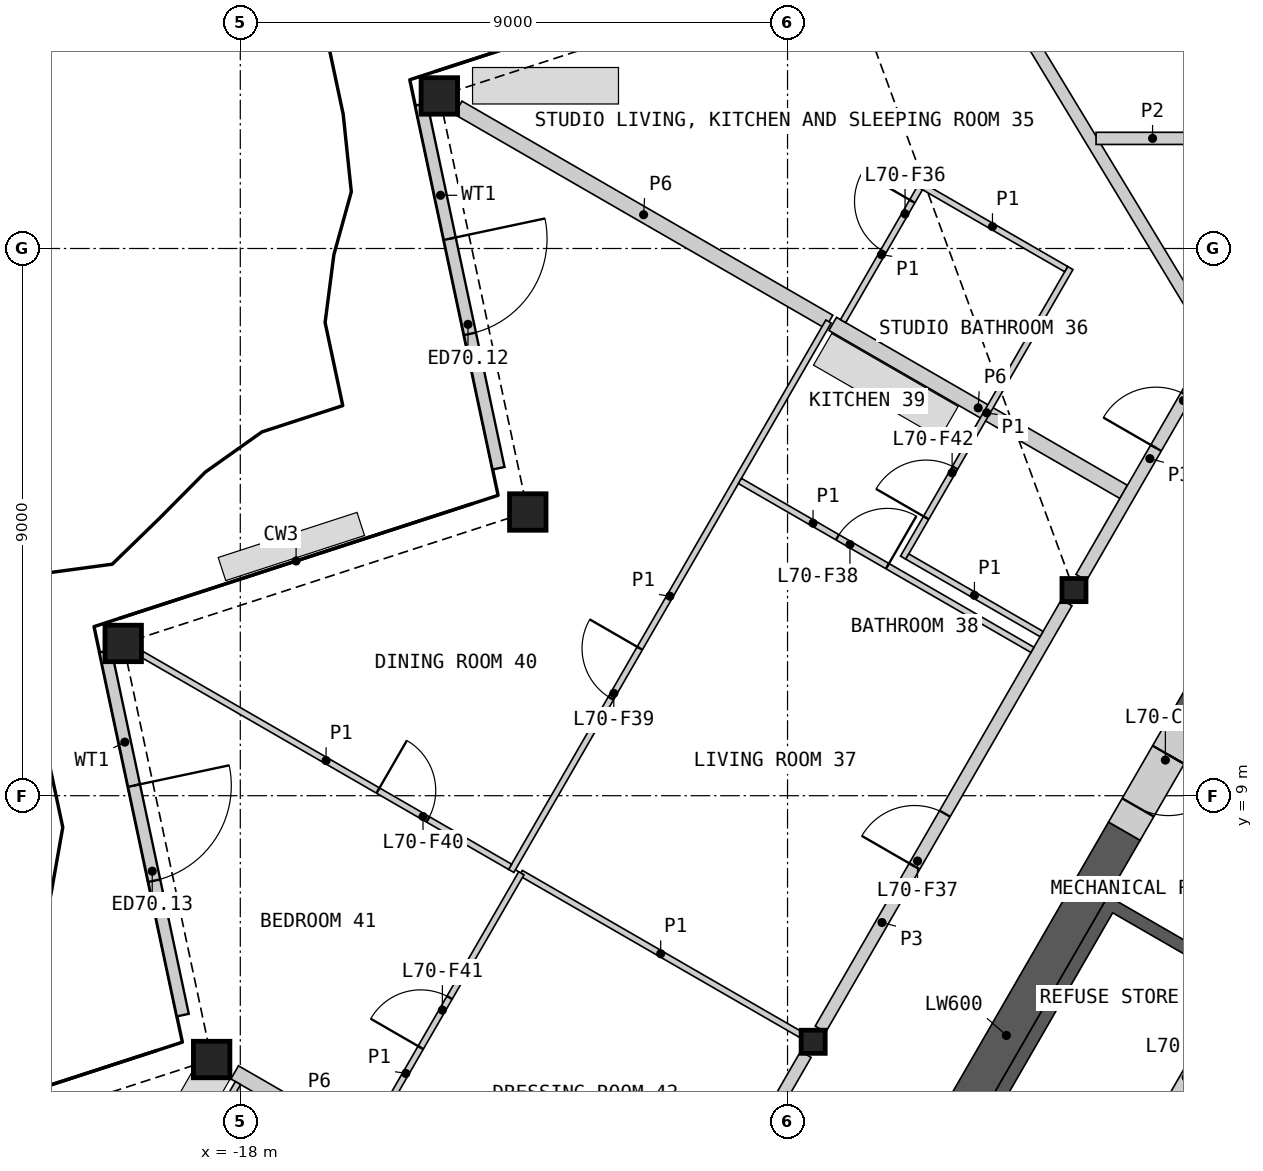
"""IFC4 building model, lengths in metres.
Left out: names, types, materials, properties, quantities, classifications, styles, units other than length and angle.
Written with IfcOpenShell. Run it as: python <this file> out.ifc"""

import sys

from ifc_helpers import new_model, si_unit, direction, frame, frame_2d, origin, origin_2d, place, context, subcontext, project, spatial, polyline, rectangle, hollow_rectangle, i_section, outline, extrude, element, fill, save


model = new_model("IFC4")
c1 = context("Model", 3, precision=1e-05, world=origin(), true_north=direction((0.0, 1.0)))
c2 = subcontext(c1, "Body", "Model", "MODEL_VIEW")
j1 = project(units=[si_unit("LENGTHUNIT", "METRE"), si_unit("PLANEANGLEUNIT", "RADIAN")], contexts=[c1])
p1 = place(None, origin())
s1 = spatial("IfcSite", under=j1, at=p1, CompositionType="ELEMENT")
p2 = place(p1, origin())
s2 = spatial("IfcBuilding", under=s1, at=p2, CompositionType="ELEMENT")
p3 = place(p2, frame((0.0, 0.0, 318.8)))
s3 = spatial("IfcBuildingStorey", under=s2, at=p3, CompositionType="ELEMENT", Elevation=318.8)
for number, where, z_axis, x_axis in (
    (1, (-14.727, 20.509, 0.0), (0.0, 0.0, 1.0), (1.0, 0.0, 0.0)),
    (2, (-13.272, 13.666, 0.0), (0.0, 0.0, 1.0), (1.0, 0.0, 0.0)),
    (3, (-19.926, 11.504, 0.0), (0.0, 0.0, 1.0), (1.0, 0.0, 0.0)),
    (4, (-18.471, 4.661, 0.0), (0.0, 0.0, 1.0), (1.0, 0.0, 0.0)),
):
    element("IfcColumn", number, at=place(p3, frame(where, z_axis=z_axis, x_axis=x_axis)), inside=s3, PredefinedType="COLUMN", context=c2, shape_type="SweptSolid", body=[
        extrude(hollow_rectangle(XDim=0.6, YDim=0.6, WallThickness=0.04, at=origin_2d()), origin(), (0.0, 0.0, 1.0), 3.4),
    ])
for number, where, z_axis, x_axis in (
    (5, (-4.289, 12.382, 0.0), (0.0, 0.0, 1.0), (1.0, 0.0, 0.0)),
    (6, (-8.578, 4.953, 0.0), (0.0, 0.0, 1.0), (1.0, 0.0, 0.0)),
):
    element("IfcColumn", number, at=place(p3, frame(where, z_axis=z_axis, x_axis=x_axis)), inside=s3, PredefinedType="COLUMN", context=c2, shape_type="SweptSolid", body=[
        extrude(i_section(OverallWidth=0.396, OverallDepth=0.381, WebThickness=0.019, FlangeThickness=0.03, at=origin_2d()), origin(), (0.0, 0.0, 1.0), 3.4),
    ])
p4 = place(p3, frame((-15.025, 20.372, 0.0), z_axis=(0.0, 0.0, 1.0), x_axis=(0.207932234858, -0.978143233738, 0.0)))
e7 = element("IfcWall", 7, at=p4, inside=s3, PredefinedType="SOLIDWALL", context=c2, shape_type="SweptSolid", body=[
    extrude(rectangle(XDim=6.12, YDim=0.2, at=frame_2d((3.06, 0.0))), origin(), (0.0, 0.0, 1.0), 2.488),
])
p5 = place(p4, frame((2.26, 0.0, 0.0)))
e8 = element("IfcOpeningElement", 8, at=p5, cuts=e7, PredefinedType="OPENING", context=c2, shape_type="SweptSolid", body=[
    extrude(rectangle(XDim=1.6, YDim=2.25, at=frame_2d((0.8, 1.125))), frame((0.0, 0.11, 0.0), z_axis=(0.0, -1.0, 0.0), x_axis=(1.0, 0.0, 0.0)), (0.0, 0.0, 1.0), 0.22),
])
p6 = place(p3, frame((-20.217, 11.377, 0.0), z_axis=(0.0, 0.0, 1.0), x_axis=(0.207885951908, -0.978153071354, 0.0)))
e9 = element("IfcWall", 9, at=p6, inside=s3, PredefinedType="SOLIDWALL", context=c2, shape_type="SweptSolid", body=[
    extrude(rectangle(XDim=6.12, YDim=0.2, at=frame_2d((3.06, 0.0))), origin(), (0.0, 0.0, 1.0), 2.488),
])
p7 = place(p6, frame((2.26, 0.0, 0.0)))
e10 = element("IfcOpeningElement", 10, at=p7, cuts=e9, PredefinedType="OPENING", context=c2, shape_type="SweptSolid", body=[
    extrude(rectangle(XDim=1.6, YDim=2.25, at=frame_2d((0.8, 1.125))), frame((0.0, 0.11, 0.0), z_axis=(0.0, -1.0, 0.0), x_axis=(1.0, 0.0, 0.0)), (0.0, 0.0, 1.0), 0.22),
])
p8 = place(p3, origin())
e11 = element("IfcWall", 11, at=p8, inside=s3, PredefinedType="SHEAR", context=c2, shape_type="SweptSolid", body=[
    extrude(outline(polyline([(-4.96, 0.208), (-7.131, 1.461), (-3.731, 7.35), (-1.561, 6.097), (-1.66, 5.924), (-3.652, 7.074), (-5.752, 3.437), (-3.76, 2.287), (-3.861, 2.113), (-5.852, 3.263), (-6.852, 1.531), (-4.861, 0.381), (-4.96, 0.208)])), origin(), (0.0, 0.0, 1.0), 3.1),
])
p9 = place(p3, frame((-1.631, 5.776, 0.0), z_axis=(0.0, 0.0, 1.0), x_axis=(-0.499992876559, -0.866029516466, 0.0)))
e12 = element("IfcWall", 12, at=p9, inside=s3, PredefinedType="SOLIDWALL", context=c2, shape_type="SweptSolid", body=[
    extrude(rectangle(XDim=6.486, YDim=0.2, at=frame_2d((3.243, 0.0))), origin(), (0.0, 0.0, 1.0), 3.1),
])
p10 = place(p9, frame((1.537, 0.0, 0.0)))
e13 = element("IfcOpeningElement", 13, at=p10, cuts=e12, PredefinedType="OPENING", context=c2, shape_type="SweptSolid", body=[
    extrude(rectangle(XDim=0.9, YDim=2.1, at=frame_2d((0.45, 1.05))), frame((0.0, 0.11, 0.0), z_axis=(0.0, -1.0, 0.0), x_axis=(1.0, 0.0, 0.0)), (0.0, 0.0, 1.0), 0.22),
])
p11 = place(p9, frame((4.837, 0.0, 0.0)))
e14 = element("IfcOpeningElement", 14, at=p11, cuts=e12, PredefinedType="OPENING", context=c2, shape_type="SweptSolid", body=[
    extrude(rectangle(XDim=0.9, YDim=2.1, at=frame_2d((0.45, 1.05))), frame((0.0, 0.11, 0.0), z_axis=(0.0, -1.0, 0.0), x_axis=(1.0, 0.0, 0.0)), (0.0, 0.0, 1.0), 0.22),
])
p12 = place(p3, frame((-3.461, 8.417, 0.0), z_axis=(0.0, 0.0, 1.0), x_axis=(-0.50000391502, -0.866023143435, 0.0)))
e15 = element("IfcWall", 15, at=p12, inside=s3, PredefinedType="SHEAR", context=c2, shape_type="SweptSolid", body=[
    extrude(rectangle(XDim=7.759, YDim=0.6, at=frame_2d((3.879, 0.0))), origin(), (0.0, 0.0, 1.0), 3.1),
])
p13 = place(p3, frame((-1.59, 11.658, 0.0), z_axis=(0.0, 0.0, 1.0), x_axis=(-0.500037594623, -0.866003697431, 0.0)))
e16 = element("IfcWall", 16, at=p13, inside=s3, PredefinedType="SHEAR", context=c2, shape_type="SweptSolid", body=[
    extrude(rectangle(XDim=1.542, YDim=0.6, at=frame_2d((0.771, 0.0))), origin(), (0.0, 0.0, 1.0), 3.1),
])
p14 = place(p3, frame((-2.361, 10.322, 0.0), z_axis=(0.0, 0.0, 1.0), x_axis=(-0.499946605688, -0.86605622881, 0.0)))
e17 = element("IfcWall", 17, at=p14, inside=s3, PredefinedType="SHEAR", context=c2, shape_type="SweptSolid", body=[
    extrude(rectangle(XDim=2.2, YDim=0.6, at=frame_2d((1.1, 0.0))), origin(), (0.0, 0.0, 1.0), 3.1),
])
p15 = place(p14, frame((0.75, 0.0, 0.0)))
e18 = element("IfcOpeningElement", 18, at=p15, cuts=e17, PredefinedType="OPENING", context=c2, shape_type="SweptSolid", body=[
    extrude(rectangle(XDim=1.0, YDim=2.1, at=frame_2d((0.5, 1.05))), frame((0.0, 0.31, 0.0), z_axis=(0.0, -1.0, 0.0), x_axis=(1.0, 0.0, 0.0)), (0.0, 0.0, 1.0), 0.62),
])
p16 = place(p3, frame((-8.458, 5.16, 0.0), z_axis=(0.0, 0.0, 1.0), x_axis=(0.499984266882, 0.866034487114, 0.0)))
e19 = element("IfcWall", 19, at=p16, inside=s3, PredefinedType="PARTITIONING", context=c2, shape_type="SweptSolid", body=[
    extrude(rectangle(XDim=8.099, YDim=0.2, at=frame_2d((4.049, 0.0))), origin(), (0.0, 0.0, 1.0), 3.1),
])
p17 = place(p16, frame((3.093, 0.0, 0.0)))
e20 = element("IfcOpeningElement", 20, at=p17, cuts=e19, PredefinedType="OPENING", context=c2, shape_type="SweptSolid", body=[
    extrude(rectangle(XDim=1.0, YDim=2.1, at=frame_2d((0.5, 1.05))), frame((0.0, 0.11, 0.0), z_axis=(0.0, -1.0, 0.0), x_axis=(1.0, 0.0, 0.0)), (0.0, 0.0, 1.0), 0.22),
])
p18 = place(p3, frame((-12.748, -2.269, 0.0), z_axis=(0.0, 0.0, 1.0), x_axis=(0.499984266882, 0.866034487114, 0.0)))
e21 = element("IfcWall", 21, at=p18, inside=s3, PredefinedType="PARTITIONING", context=c2, shape_type="SweptSolid", body=[
    extrude(rectangle(XDim=8.099, YDim=0.2, at=frame_2d((4.049, 0.0))), origin(), (0.0, 0.0, 1.0), 3.1),
])
p19 = place(p18, frame((1.164, 0.0, 0.0)))
e22 = element("IfcOpeningElement", 22, at=p19, cuts=e21, PredefinedType="OPENING", context=c2, shape_type="SweptSolid", body=[
    extrude(rectangle(XDim=1.0, YDim=2.1, at=frame_2d((0.5, 1.05))), frame((0.0, 0.11, 0.0), z_axis=(0.0, -1.0, 0.0), x_axis=(1.0, 0.0, 0.0)), (0.0, 0.0, 1.0), 0.22),
])
p20 = place(p3, frame((-14.417, 20.316, 0.0), z_axis=(0.0, 0.0, 1.0), x_axis=(0.866022207469, -0.50000553614, 0.0)))
e23 = element("IfcWall", 23, at=p20, inside=s3, PredefinedType="PARTITIONING", context=c2, shape_type="SweptSolid", body=[
    extrude(rectangle(XDim=7.042, YDim=0.25, at=frame_2d((3.521, 0.0))), origin(), (0.0, 0.0, 1.0), 2.33),
])
p21 = place(p3, frame((-8.257, 16.76, 0.0), z_axis=(0.0, 0.0, 1.0), x_axis=(0.866034739526, -0.499983829672, 0.0)))
e24 = element("IfcWall", 24, at=p21, inside=s3, PredefinedType="PARTITIONING", context=c2, shape_type="SweptSolid", body=[
    extrude(rectangle(XDim=5.525, YDim=0.25, at=frame_2d((2.763, 0.0))), origin(), (0.0, 0.0, 1.0), 2.33),
])
p22 = place(p3, frame((-4.169, 12.59, 0.0), z_axis=(0.0, 0.0, 1.0), x_axis=(0.499950370306, 0.866054055606, 0.0)))
e25 = element("IfcWall", 25, at=p22, inside=s3, PredefinedType="PARTITIONING", context=c2, shape_type="SweptSolid", body=[
    extrude(rectangle(XDim=4.513, YDim=0.2, at=frame_2d((2.256, 0.0))), origin(), (0.0, 0.0, 1.0), 3.1),
])
p23 = place(p22, frame((2.459, 0.0, 0.0)))
e26 = element("IfcOpeningElement", 26, at=p23, cuts=e25, PredefinedType="OPENING", context=c2, shape_type="SweptSolid", body=[
    extrude(rectangle(XDim=1.0, YDim=2.1, at=frame_2d((0.5, 1.05))), frame((0.0, 0.11, 0.0), z_axis=(0.0, -1.0, 0.0), x_axis=(1.0, 0.0, 0.0)), (0.0, 0.0, 1.0), 0.22),
])
p24 = place(p3, frame((-18.092, 4.449, 0.0), z_axis=(0.0, 0.0, 1.0), x_axis=(0.866043267704, -0.499969057507, 0.0)))
e27 = element("IfcWall", 27, at=p24, inside=s3, PredefinedType="PARTITIONING", context=c2, shape_type="SweptSolid", body=[
    extrude(rectangle(XDim=2.571, YDim=0.25, at=frame_2d((1.286, 0.0))), origin(), (0.0, 0.0, 1.0), 2.33),
])
p25 = place(p3, frame((-9.669, 29.144, 0.0), z_axis=(0.0, 0.0, 1.0), x_axis=(0.517770554559, -0.85551952218, 0.0)))
e28 = element("IfcWall", 28, at=p25, inside=s3, PredefinedType="PARTITIONING", context=c2, shape_type="SweptSolid", body=[
    extrude(rectangle(XDim=14.784, YDim=0.2, at=frame_2d((7.392, 0.0))), origin(), (0.0, 0.0, 1.0), 2.33),
])
p26 = place(p3, frame((-3.926, 19.811, 0.0), z_axis=(0.0, 0.0, 1.0), x_axis=(1.0, 0.0, 0.0)))
e29 = element("IfcWall", 29, at=p26, inside=s3, PredefinedType="PARTITIONING", context=c2, shape_type="SweptSolid", body=[
    extrude(rectangle(XDim=3.718, YDim=0.2, at=frame_2d((1.859, 0.0))), origin(), (0.0, 0.0, 1.0), 2.33),
])
p27 = place(p26, frame((1.59, 0.0, 0.0)))
e30 = element("IfcOpeningElement", 30, at=p27, cuts=e29, PredefinedType="OPENING", context=c2, shape_type="SweptSolid", body=[
    extrude(rectangle(XDim=0.95, YDim=2.1, at=frame_2d((0.475, 1.05))), frame((0.0, 0.11, 0.0), z_axis=(0.0, -1.0, 0.0), x_axis=(1.0, 0.0, 0.0)), (0.0, 0.0, 1.0), 0.22),
])
p28 = place(p3, frame((-13.544, 7.762, 0.0), z_axis=(0.0, 0.0, 1.0), x_axis=(0.499993819111, 0.866028972293, 0.0)))
e31 = element("IfcWall", 31, at=p28, inside=s3, PredefinedType="PARTITIONING", context=c2, shape_type="SweptSolid", body=[
    extrude(rectangle(XDim=10.436, YDim=0.1, at=frame_2d((5.218, 0.0))), origin(), (0.0, 0.0, 1.0), 2.33),
])
p29 = place(p28, frame((3.279, 0.0, 0.0)))
e32 = element("IfcOpeningElement", 32, at=p29, cuts=e31, PredefinedType="OPENING", context=c2, shape_type="SweptSolid", body=[
    extrude(rectangle(XDim=0.95, YDim=2.1, at=frame_2d((0.475, 1.05))), frame((0.0, 0.06, 0.0), z_axis=(0.0, -1.0, 0.0), x_axis=(1.0, 0.0, 0.0)), (0.0, 0.0, 1.0), 0.12),
])
p30 = place(p3, frame((-19.615, 11.325, 0.0), z_axis=(0.0, 0.0, 1.0), x_axis=(0.866013987544, -0.500019772988, 0.0)))
e33 = element("IfcWall", 33, at=p30, inside=s3, PredefinedType="PARTITIONING", context=c2, shape_type="SweptSolid", body=[
    extrude(rectangle(XDim=6.99, YDim=0.1, at=frame_2d((3.495, 0.0))), origin(), (0.0, 0.0, 1.0), 2.33),
])
p31 = place(p30, frame((4.48, 0.0, 0.0)))
e34 = element("IfcOpeningElement", 34, at=p31, cuts=e33, PredefinedType="OPENING", context=c2, shape_type="SweptSolid", body=[
    extrude(rectangle(XDim=0.95, YDim=2.1, at=frame_2d((0.475, 1.05))), frame((0.0, 0.06, 0.0), z_axis=(0.0, -1.0, 0.0), x_axis=(1.0, 0.0, 0.0)), (0.0, 0.0, 1.0), 0.12),
])
p32 = place(p3, frame((-9.783, 14.177, 0.0), z_axis=(0.0, 0.0, 1.0), x_axis=(0.866030435321, -0.499991285022, 0.0)))
e35 = element("IfcWall", 35, at=p32, inside=s3, PredefinedType="PARTITIONING", context=c2, shape_type="SweptSolid", body=[
    extrude(rectangle(XDim=5.555, YDim=0.1, at=frame_2d((2.778, 0.0))), origin(), (0.0, 0.0, 1.0), 2.33),
])
p33 = place(p32, frame((1.852, 0.0, 0.0)))
e36 = element("IfcOpeningElement", 36, at=p33, cuts=e35, PredefinedType="OPENING", context=c2, shape_type="SweptSolid", body=[
    extrude(rectangle(XDim=0.95, YDim=2.1, at=frame_2d((0.475, 1.05))), frame((0.0, 0.06, 0.0), z_axis=(0.0, -1.0, 0.0), x_axis=(1.0, 0.0, 0.0)), (0.0, 0.0, 1.0), 0.12),
])
p34 = place(p3, frame((-7.099, 12.915, 0.0), z_axis=(0.0, 0.0, 1.0), x_axis=(0.49997732567, 0.866038494419, 0.0)))
e37 = element("IfcWall", 37, at=p34, inside=s3, PredefinedType="PARTITIONING", context=c2, shape_type="SweptSolid", body=[
    extrude(rectangle(XDim=5.5, YDim=0.1, at=frame_2d((2.75, 0.0))), origin(), (0.0, 0.0, 1.0), 2.33),
])
p35 = place(p34, frame((0.756, 0.0, 0.0)))
e38 = element("IfcOpeningElement", 38, at=p35, cuts=e37, PredefinedType="OPENING", context=c2, shape_type="SweptSolid", body=[
    extrude(rectangle(XDim=0.95, YDim=2.1, at=frame_2d((0.475, 1.05))), frame((0.0, 0.06, 0.0), z_axis=(0.0, -1.0, 0.0), x_axis=(1.0, 0.0, 0.0)), (0.0, 0.0, 1.0), 0.12),
])
p36 = place(p3, frame((-13.386, 7.729, 0.0), z_axis=(0.0, 0.0, 1.0), x_axis=(0.866034036823, -0.49998504684, 0.0)))
e39 = element("IfcWall", 39, at=p36, inside=s3, PredefinedType="PARTITIONING", context=c2, shape_type="SweptSolid", body=[
    extrude(rectangle(XDim=5.312, YDim=0.1, at=frame_2d((2.656, 0.0))), origin(), (0.0, 0.0, 1.0), 2.33),
])
p37 = place(p3, frame((-15.912, 3.335, 0.0), z_axis=(0.0, 0.0, 1.0), x_axis=(0.49999906822, 0.866025941747, 0.0)))
e40 = element("IfcWall", 40, at=p37, inside=s3, PredefinedType="PARTITIONING", context=c2, shape_type="SweptSolid", body=[
    extrude(rectangle(XDim=5.068, YDim=0.1, at=frame_2d((2.534, 0.0))), origin(), (0.0, 0.0, 1.0), 2.33),
])
p38 = place(p37, frame((1.757, 0.0, 0.0)))
e41 = element("IfcOpeningElement", 41, at=p38, cuts=e40, PredefinedType="OPENING", context=c2, shape_type="SweptSolid", body=[
    extrude(rectangle(XDim=0.95, YDim=2.1, at=frame_2d((0.475, 1.05))), frame((0.0, 0.06, 0.0), z_axis=(0.0, -1.0, 0.0), x_axis=(1.0, 0.0, 0.0)), (0.0, 0.0, 1.0), 0.12),
])
p39 = place(p3, frame((-20.547, -0.072, 0.0), z_axis=(0.0, 0.0, 1.0), x_axis=(0.499969537666, 0.866042990507, 0.0)))
e42 = element("IfcWall", 42, at=p39, inside=s3, PredefinedType="PARTITIONING", context=c2, shape_type="SweptSolid", body=[
    extrude(rectangle(XDim=5.018, YDim=0.1, at=frame_2d((2.509, 0.0))), origin(), (0.0, 0.0, 1.0), 2.33),
])
p40 = place(p39, frame((0.862, 0.0, 0.0)))
e43 = element("IfcOpeningElement", 43, at=p40, cuts=e42, PredefinedType="OPENING", context=c2, shape_type="SweptSolid", body=[
    extrude(rectangle(XDim=0.95, YDim=2.1, at=frame_2d((0.475, 1.05))), frame((0.0, 0.06, 0.0), z_axis=(0.0, -1.0, 0.0), x_axis=(1.0, 0.0, 0.0)), (0.0, 0.0, 1.0), 0.12),
])
p41 = place(p3, frame((-6.842, 19.06, 0.0), z_axis=(0.0, 0.0, 1.0), x_axis=(0.866034573852, -0.49998411664, 0.0)))
e44 = element("IfcWall", 44, at=p41, inside=s3, PredefinedType="PARTITIONING", context=c2, shape_type="SweptSolid", body=[
    extrude(rectangle(XDim=2.8, YDim=0.1, at=frame_2d((1.4, 0.0))), origin(), (0.0, 0.0, 1.0), 2.33),
])
p42 = place(p3, frame((-7.031, 12.934, 0.0), z_axis=(0.0, 0.0, 1.0), x_axis=(0.866030925526, -0.499990435942, 0.0)))
e45 = element("IfcWall", 45, at=p42, inside=s3, PredefinedType="PARTITIONING", context=c2, shape_type="SweptSolid", body=[
    extrude(rectangle(XDim=2.55, YDim=0.1, at=frame_2d((1.275, 0.0))), origin(), (0.0, 0.0, 1.0), 2.33),
])
p43 = place(p3, frame((-8.086, 16.805, 0.0), z_axis=(0.0, 0.0, 1.0), x_axis=(0.50001820224, 0.866014894461, 0.0)))
e46 = element("IfcWall", 46, at=p43, inside=s3, PredefinedType="PARTITIONING", context=c2, shape_type="SweptSolid", body=[
    extrude(rectangle(XDim=2.525, YDim=0.1, at=frame_2d((1.262, 0.0))), origin(), (0.0, 0.0, 1.0), 2.33),
])
p44 = place(p43, frame((1.325, 0.0, 0.0)))
e47 = element("IfcOpeningElement", 47, at=p44, cuts=e46, PredefinedType="OPENING", context=c2, shape_type="SweptSolid", body=[
    extrude(rectangle(XDim=0.95, YDim=2.1, at=frame_2d((0.475, 1.05))), frame((0.0, 0.06, 0.0), z_axis=(0.0, -1.0, 0.0), x_axis=(1.0, 0.0, 0.0)), (0.0, 0.0, 1.0), 0.12),
])
p45 = place(p5, origin())
e48 = element("IfcDoor", 48, at=p45, inside=s3, OperationType="DOUBLE_DOOR_SINGLE_SWING", PredefinedType="DOOR", context=c2, shape_type="SweptSolid", body=[
    extrude(rectangle(XDim=1.6, YDim=2.25, at=frame_2d((0.8, 1.125))), frame((0.0, 0.025, 0.0), z_axis=(0.0, -1.0, 0.0), x_axis=(1.0, 0.0, 0.0)), (0.0, 0.0, 1.0), 0.05),
])
fill(e8, e48)
p46 = place(p7, origin())
e49 = element("IfcDoor", 49, at=p46, inside=s3, OperationType="DOUBLE_DOOR_SINGLE_SWING", PredefinedType="DOOR", context=c2, shape_type="SweptSolid", body=[
    extrude(rectangle(XDim=1.6, YDim=2.25, at=frame_2d((0.8, 1.125))), frame((0.0, 0.025, 0.0), z_axis=(0.0, -1.0, 0.0), x_axis=(1.0, 0.0, 0.0)), (0.0, 0.0, 1.0), 0.05),
])
fill(e10, e49)
p47 = place(p10, origin())
e50 = element("IfcDoor", 50, at=p47, inside=s3, OperationType="SINGLE_SWING_LEFT", PredefinedType="DOOR", context=c2, shape_type="SweptSolid", body=[
    extrude(rectangle(XDim=0.9, YDim=2.1, at=frame_2d((0.45, 1.05))), frame((0.0, 0.025, 0.0), z_axis=(0.0, -1.0, 0.0), x_axis=(1.0, 0.0, 0.0)), (0.0, 0.0, 1.0), 0.05),
])
fill(e13, e50)
p48 = place(p15, origin())
e51 = element("IfcDoor", 51, at=p48, inside=s3, OperationType="SINGLE_SWING_LEFT", PredefinedType="DOOR", context=c2, shape_type="SweptSolid", body=[
    extrude(rectangle(XDim=1.0, YDim=2.1, at=frame_2d((0.5, 1.05))), frame((0.0, 0.055, 0.0), z_axis=(0.0, -1.0, 0.0), x_axis=(1.0, 0.0, 0.0)), (0.0, 0.0, 1.0), 0.05),
])
fill(e18, e51)
p49 = place(p23, origin())
e52 = element("IfcDoor", 52, at=p49, inside=s3, OperationType="SINGLE_SWING_LEFT", PredefinedType="DOOR", context=c2, shape_type="SweptSolid", body=[
    extrude(rectangle(XDim=1.0, YDim=2.1, at=frame_2d((0.5, 1.05))), frame((0.0, 0.025, 0.0), z_axis=(0.0, -1.0, 0.0), x_axis=(1.0, 0.0, 0.0)), (0.0, 0.0, 1.0), 0.05),
])
fill(e26, e52)
p50 = place(p44, origin())
e53 = element("IfcDoor", 53, at=p50, inside=s3, OperationType="SINGLE_SWING_RIGHT", PredefinedType="DOOR", context=c2, shape_type="SweptSolid", body=[
    extrude(rectangle(XDim=0.95, YDim=2.1, at=frame_2d((0.475, 1.05))), frame((0.0, 0.025, 0.0), z_axis=(0.0, -1.0, 0.0), x_axis=(1.0, 0.0, 0.0)), (0.0, 0.0, 1.0), 0.05),
])
fill(e47, e53)
p51 = place(p17, origin())
e54 = element("IfcDoor", 54, at=p51, inside=s3, OperationType="SINGLE_SWING_LEFT", PredefinedType="DOOR", context=c2, shape_type="SweptSolid", body=[
    extrude(rectangle(XDim=1.0, YDim=2.1, at=frame_2d((0.5, 1.05))), frame((0.0, 0.025, 0.0), z_axis=(0.0, -1.0, 0.0), x_axis=(1.0, 0.0, 0.0)), (0.0, 0.0, 1.0), 0.05),
])
fill(e20, e54)
p52 = place(p33, origin())
e55 = element("IfcDoor", 55, at=p52, inside=s3, OperationType="SINGLE_SWING_RIGHT", PredefinedType="DOOR", context=c2, shape_type="SweptSolid", body=[
    extrude(rectangle(XDim=0.95, YDim=2.1, at=frame_2d((0.475, 1.05))), frame((0.0, 0.025, 0.0), z_axis=(0.0, -1.0, 0.0), x_axis=(1.0, 0.0, 0.0)), (0.0, 0.0, 1.0), 0.05),
])
fill(e36, e55)
p53 = place(p29, origin())
e56 = element("IfcDoor", 56, at=p53, inside=s3, OperationType="SINGLE_SWING_RIGHT", PredefinedType="DOOR", context=c2, shape_type="SweptSolid", body=[
    extrude(rectangle(XDim=0.95, YDim=2.1, at=frame_2d((0.475, 1.05))), frame((0.0, 0.025, 0.0), z_axis=(0.0, -1.0, 0.0), x_axis=(1.0, 0.0, 0.0)), (0.0, 0.0, 1.0), 0.05),
])
fill(e32, e56)
p54 = place(p31, origin())
e57 = element("IfcDoor", 57, at=p54, inside=s3, OperationType="SINGLE_SWING_LEFT", PredefinedType="DOOR", context=c2, shape_type="SweptSolid", body=[
    extrude(rectangle(XDim=0.95, YDim=2.1, at=frame_2d((0.475, 1.05))), frame((0.0, 0.025, 0.0), z_axis=(0.0, -1.0, 0.0), x_axis=(1.0, 0.0, 0.0)), (0.0, 0.0, 1.0), 0.05),
])
fill(e34, e57)
p55 = place(p38, origin())
e58 = element("IfcDoor", 58, at=p55, inside=s3, OperationType="SINGLE_SWING_LEFT", PredefinedType="DOOR", context=c2, shape_type="SweptSolid", body=[
    extrude(rectangle(XDim=0.95, YDim=2.1, at=frame_2d((0.475, 1.05))), frame((0.0, 0.025, 0.0), z_axis=(0.0, -1.0, 0.0), x_axis=(1.0, 0.0, 0.0)), (0.0, 0.0, 1.0), 0.05),
])
fill(e41, e58)
p56 = place(p35, origin())
e59 = element("IfcDoor", 59, at=p56, inside=s3, OperationType="SINGLE_SWING_LEFT", PredefinedType="DOOR", context=c2, shape_type="SweptSolid", body=[
    extrude(rectangle(XDim=0.95, YDim=2.1, at=frame_2d((0.475, 1.05))), frame((0.0, 0.025, 0.0), z_axis=(0.0, -1.0, 0.0), x_axis=(1.0, 0.0, 0.0)), (0.0, 0.0, 1.0), 0.05),
])
fill(e38, e59)
save(model, sys.argv[1])
